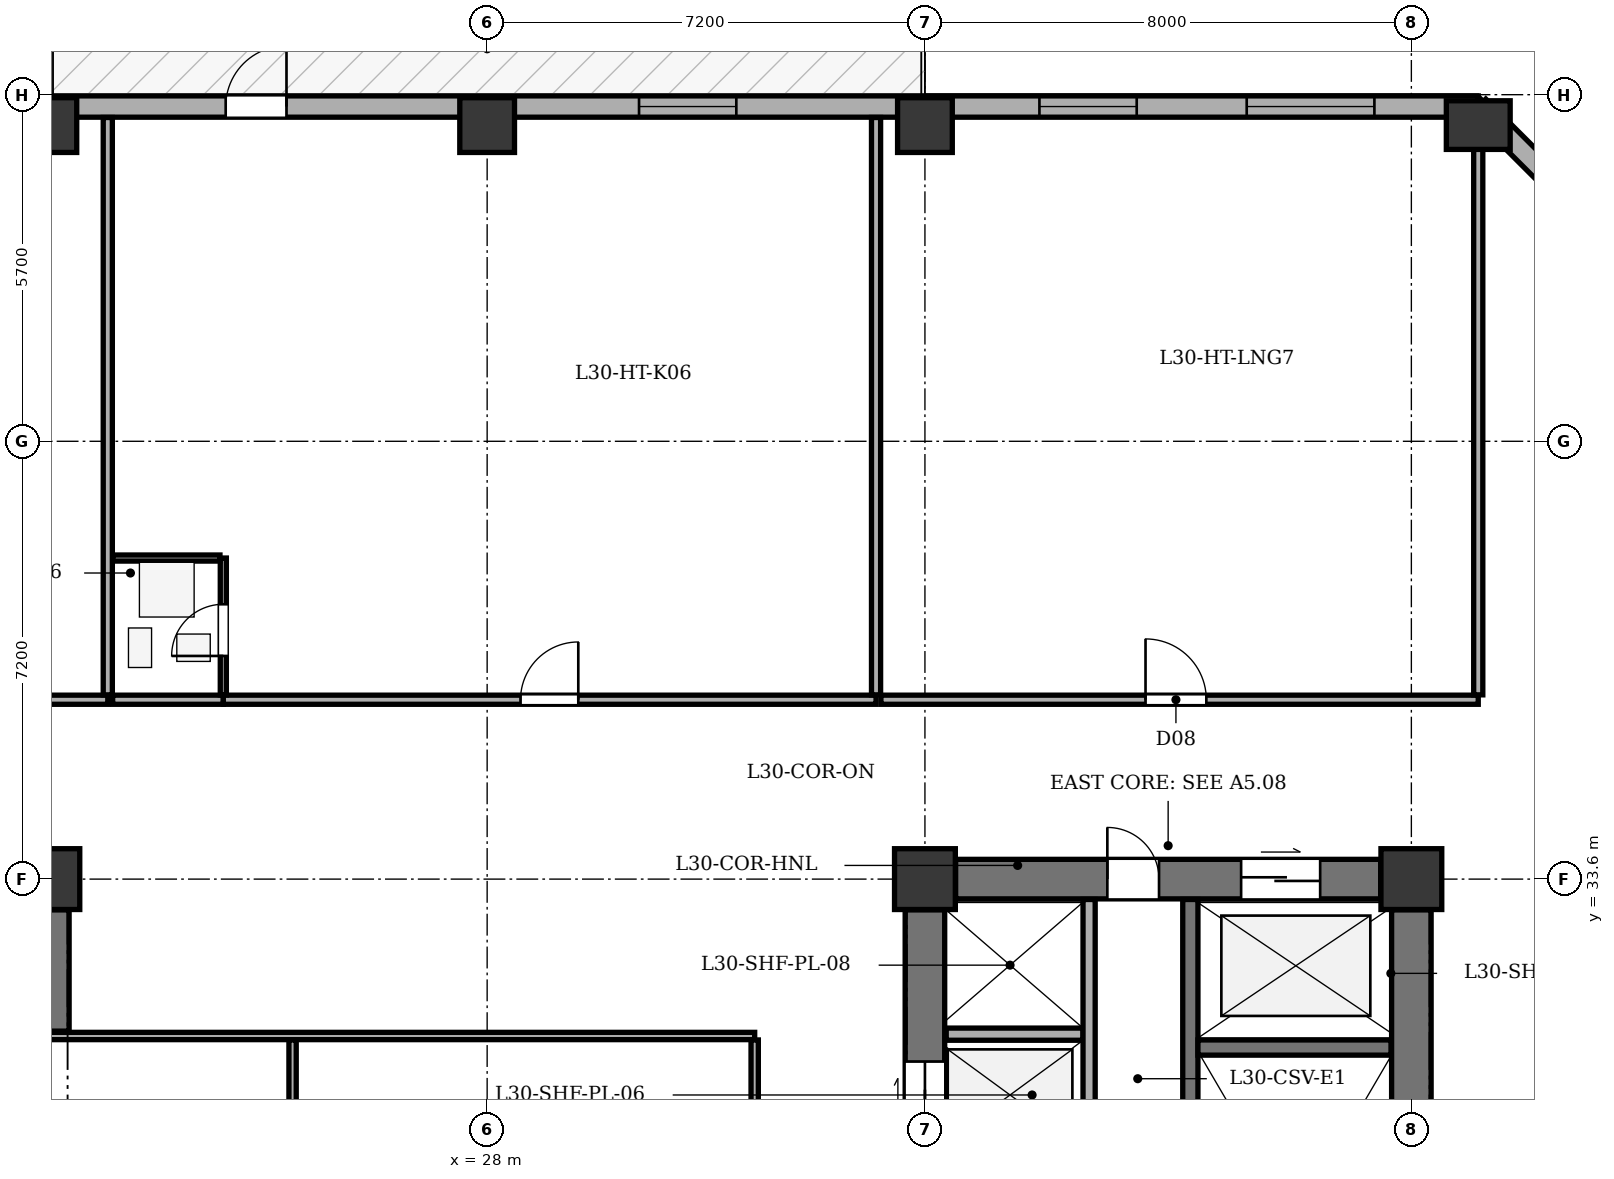
"""IFC4 building model, lengths in metres.
Left out: names, types, materials, properties, quantities, classifications, styles, units other than length and angle.
Written with IfcOpenShell. Run it as: python <this file> out.ifc"""

import sys

from ifc_helpers import new_model, si_unit, direction, frame, frame_2d, origin, origin_2d, place, context, subcontext, project, spatial, rectangle, extrude, element, fill, save


model = new_model("IFC4")
c1 = context("Model", 3, precision=1e-05, world=origin(), true_north=direction((0.0, 1.0)))
c2 = subcontext(c1, "Body", "Model", "MODEL_VIEW")
j1 = project(units=[si_unit("LENGTHUNIT", "METRE"), si_unit("PLANEANGLEUNIT", "RADIAN")], contexts=[c1])
p1 = place(None, origin())
s1 = spatial("IfcSite", under=j1, at=p1, CompositionType="ELEMENT")
p2 = place(p1, origin())
s2 = spatial("IfcBuilding", under=s1, at=p2, CompositionType="ELEMENT")
p3 = place(p2, frame((0.0, 0.0, 123.8)))
s3 = spatial("IfcBuildingStorey", under=s2, at=p3, CompositionType="ELEMENT", Elevation=123.8)
for number, where, z_axis, x_axis in (
    (1, (20.8, 33.6, 0.0), (0.0, 0.0, 1.0), (1.0, 0.0, 0.0)),
    (2, (35.2, 33.6, 0.0), (0.0, 0.0, 1.0), (1.0, 0.0, 0.0)),
    (3, (43.2, 33.6, 0.0), (0.0, 0.0, 1.0), (1.0, 0.0, 0.0)),
):
    element("IfcColumn", number, at=place(p3, frame(where, z_axis=z_axis, x_axis=x_axis)), inside=s3, PredefinedType="COLUMN", context=c2, shape_type="SweptSolid", body=[
        extrude(rectangle(XDim=1.0, YDim=1.0, at=origin_2d()), origin(), (0.0, 0.0, 1.0), 3.5),
    ])
for number, where, z_axis, x_axis in (
    (4, (20.8, 46.0, 0.0), (0.0, 0.0, 1.0), (1.0, 0.0, 0.0)),
    (5, (28.0, 46.0, 0.0), (0.0, 0.0, 1.0), (1.0, 0.0, 0.0)),
    (6, (35.2, 46.0, 0.0), (0.0, 0.0, 1.0), (1.0, 0.0, 0.0)),
):
    element("IfcColumn", number, at=place(p3, frame(where, z_axis=z_axis, x_axis=x_axis)), inside=s3, PredefinedType="COLUMN", context=c2, shape_type="SweptSolid", body=[
        extrude(rectangle(XDim=0.9, YDim=0.9, at=origin_2d()), origin(), (0.0, 0.0, 1.0), 3.5),
    ])
p4 = place(p3, frame((44.3, 46.0, 0.0), z_axis=(0.0, 0.0, 1.0), x_axis=(1.0, 0.0, 0.0)))
e7 = element("IfcColumn", 7, at=p4, inside=s3, PredefinedType="COLUMN", context=c2, shape_type="SweptSolid", body=[
    extrude(rectangle(XDim=0.8, YDim=1.05, at=origin_2d()), origin(), (0.0, 0.0, 1.0), 3.5),
])
p5 = place(p3, frame((9.3, 46.305, 0.0), z_axis=(0.0, 0.0, 1.0), x_axis=(1.0, 0.0, 0.0)))
e8 = element("IfcWall", 8, at=p5, inside=s3, PredefinedType="STANDARD", context=c2, shape_type="SweptSolid", body=[
    extrude(rectangle(XDim=35.0, YDim=0.35, at=frame_2d((17.5, 0.0))), origin(), (0.0, 0.0, 1.0), 2.785),
])
p6 = place(p5, frame((14.4, 0.0, 0.0)))
e9 = element("IfcOpeningElement", 9, at=p6, cuts=e8, PredefinedType="OPENING", context=c2, shape_type="SweptSolid", body=[
    extrude(rectangle(XDim=1.0, YDim=2.02, at=frame_2d((0.5, 1.01))), frame((0.0, 0.185, 0.0), z_axis=(0.0, -1.0, 0.0), x_axis=(1.0, 0.0, 0.0)), (0.0, 0.0, 1.0), 0.37),
])
p7 = place(p5, frame((3.007, 0.0, 0.75)))
e10 = element("IfcOpeningElement", 10, at=p7, cuts=e8, PredefinedType="OPENING", context=c2, shape_type="SweptSolid", body=[
    extrude(rectangle(XDim=1.6, YDim=1.75, at=frame_2d((0.8, 0.875))), frame((0.0, 0.185, 0.0), z_axis=(0.0, -1.0, 0.0), x_axis=(1.0, 0.0, 0.0)), (0.0, 0.0, 1.0), 0.37),
])
p8 = place(p5, frame((7.293, 0.0, 0.75)))
e11 = element("IfcOpeningElement", 11, at=p8, cuts=e8, PredefinedType="OPENING", context=c2, shape_type="SweptSolid", body=[
    extrude(rectangle(XDim=2.1, YDim=1.75, at=frame_2d((1.05, 0.875))), frame((0.0, 0.185, 0.0), z_axis=(0.0, -1.0, 0.0), x_axis=(1.0, 0.0, 0.0)), (0.0, 0.0, 1.0), 0.37),
])
p9 = place(p5, frame((21.198, 0.0, 0.75)))
e12 = element("IfcOpeningElement", 12, at=p9, cuts=e8, PredefinedType="OPENING", context=c2, shape_type="SweptSolid", body=[
    extrude(rectangle(XDim=1.6, YDim=1.75, at=frame_2d((0.8, 0.875))), frame((0.0, 0.185, 0.0), z_axis=(0.0, -1.0, 0.0), x_axis=(1.0, 0.0, 0.0)), (0.0, 0.0, 1.0), 0.37),
])
p10 = place(p5, frame((27.783, 0.0, 0.75)))
e13 = element("IfcOpeningElement", 13, at=p10, cuts=e8, PredefinedType="OPENING", context=c2, shape_type="SweptSolid", body=[
    extrude(rectangle(XDim=1.6, YDim=1.75, at=frame_2d((0.8, 0.875))), frame((0.0, 0.185, 0.0), z_axis=(0.0, -1.0, 0.0), x_axis=(1.0, 0.0, 0.0)), (0.0, 0.0, 1.0), 0.37),
])
p11 = place(p5, frame((31.192, 0.0, 0.75)))
e14 = element("IfcOpeningElement", 14, at=p11, cuts=e8, PredefinedType="OPENING", context=c2, shape_type="SweptSolid", body=[
    extrude(rectangle(XDim=2.1, YDim=1.75, at=frame_2d((1.05, 0.875))), frame((0.0, 0.185, 0.0), z_axis=(0.0, -1.0, 0.0), x_axis=(1.0, 0.0, 0.0)), (0.0, 0.0, 1.0), 0.37),
])
p12 = place(p3, frame((44.3, 46.305, 0.0), z_axis=(0.0, 0.0, 1.0), x_axis=(0.707106781187, -0.707106781187, 0.0)))
e15 = element("IfcWall", 15, at=p12, inside=s3, PredefinedType="STANDARD", context=c2, shape_type="SweptSolid", body=[
    extrude(rectangle(XDim=6.795, YDim=0.35, at=frame_2d((3.397, 0.0))), origin(), (0.0, 0.0, 1.0), 2.785),
])
p13 = place(p12, frame((2.698, 0.0, 0.75)))
e16 = element("IfcOpeningElement", 16, at=p13, cuts=e15, PredefinedType="OPENING", context=c2, shape_type="SweptSolid", body=[
    extrude(rectangle(XDim=1.4, YDim=1.65, at=frame_2d((0.7, 0.825))), frame((0.0, 0.185, 0.0), z_axis=(0.0, -1.0, 0.0), x_axis=(1.0, 0.0, 0.0)), (0.0, 0.0, 1.0), 0.37),
])
p14 = place(p3, frame((20.8, 31.1, 0.0), z_axis=(0.0, 0.0, 1.0), x_axis=(0.0, 1.0, 0.0)))
e17 = element("IfcWall", 17, at=p14, inside=s3, PredefinedType="SHEAR", context=c2, shape_type="SweptSolid", body=[
    extrude(rectangle(XDim=1.995, YDim=0.65, at=frame_2d((0.998, 0.0))), origin(), (0.0, 0.0, 1.0), 3.2),
])
p15 = place(p3, frame((43.2, 21.305, 0.0), z_axis=(0.0, 0.0, 1.0), x_axis=(0.0, 1.0, 0.0)))
e18 = element("IfcWall", 18, at=p15, inside=s3, PredefinedType="SHEAR", context=c2, shape_type="SweptSolid", body=[
    extrude(rectangle(XDim=11.79, YDim=0.65, at=frame_2d((5.895, 0.0))), origin(), (0.0, 0.0, 1.0), 3.2),
])
p16 = place(p3, frame((35.705, 33.6, 0.0), z_axis=(0.0, 0.0, 1.0), x_axis=(1.0, 0.0, 0.0)))
e19 = element("IfcWall", 19, at=p16, inside=s3, PredefinedType="SHEAR", context=c2, shape_type="SweptSolid", body=[
    extrude(rectangle(XDim=6.99, YDim=0.65, at=frame_2d((3.495, 0.0))), origin(), (0.0, 0.0, 1.0), 3.2),
])
p17 = place(p16, frame((4.695, 0.0, 0.0)))
e20 = element("IfcOpeningElement", 20, at=p17, cuts=e19, PredefinedType="OPENING", context=c2, shape_type="SweptSolid", body=[
    extrude(rectangle(XDim=1.3, YDim=2.15, at=frame_2d((0.65, 1.075))), frame((0.0, 0.335, 0.0), z_axis=(0.0, -1.0, 0.0), x_axis=(1.0, 0.0, 0.0)), (0.0, 0.0, 1.0), 0.67),
])
p18 = place(p16, frame((2.495, 0.0, 0.0)))
e21 = element("IfcOpeningElement", 21, at=p18, cuts=e19, PredefinedType="OPENING", context=c2, shape_type="SweptSolid", body=[
    extrude(rectangle(XDim=0.85, YDim=2.02, at=frame_2d((0.425, 1.01))), frame((0.0, 0.335, 0.0), z_axis=(0.0, -1.0, 0.0), x_axis=(1.0, 0.0, 0.0)), (0.0, 0.0, 1.0), 0.67),
])
p19 = place(p3, frame((35.2, 21.305, 0.0), z_axis=(0.0, 0.0, 1.0), x_axis=(0.0, 1.0, 0.0)))
e22 = element("IfcWall", 22, at=p19, inside=s3, PredefinedType="SHEAR", context=c2, shape_type="SweptSolid", body=[
    extrude(rectangle(XDim=11.79, YDim=0.65, at=frame_2d((5.895, 0.0))), origin(), (0.0, 0.0, 1.0), 3.2),
])
p20 = place(p19, frame((1.295, 0.0, 0.0)))
e23 = element("IfcOpeningElement", 23, at=p20, cuts=e22, PredefinedType="OPENING", context=c2, shape_type="SweptSolid", body=[
    extrude(rectangle(XDim=1.2, YDim=2.15, at=frame_2d((0.6, 1.075))), frame((0.0, 0.335, 0.0), z_axis=(0.0, -1.0, 0.0), x_axis=(1.0, 0.0, 0.0)), (0.0, 0.0, 1.0), 0.67),
])
p21 = place(p19, frame((4.295, 0.0, 0.0)))
e24 = element("IfcOpeningElement", 24, at=p21, cuts=e22, PredefinedType="OPENING", context=c2, shape_type="SweptSolid", body=[
    extrude(rectangle(XDim=1.1, YDim=2.1, at=frame_2d((0.55, 1.05))), frame((0.0, 0.335, 0.0), z_axis=(0.0, -1.0, 0.0), x_axis=(1.0, 0.0, 0.0)), (0.0, 0.0, 1.0), 0.67),
])
p22 = place(p19, frame((6.245, 0.0, 0.0)))
e25 = element("IfcOpeningElement", 25, at=p22, cuts=e22, PredefinedType="OPENING", context=c2, shape_type="SweptSolid", body=[
    extrude(rectangle(XDim=1.1, YDim=2.1, at=frame_2d((0.55, 1.05))), frame((0.0, 0.335, 0.0), z_axis=(0.0, -1.0, 0.0), x_axis=(1.0, 0.0, 0.0)), (0.0, 0.0, 1.0), 0.67),
])
p23 = place(p19, frame((8.195, 0.0, 0.0)))
e26 = element("IfcOpeningElement", 26, at=p23, cuts=e22, PredefinedType="OPENING", context=c2, shape_type="SweptSolid", body=[
    extrude(rectangle(XDim=1.1, YDim=2.1, at=frame_2d((0.55, 1.05))), frame((0.0, 0.335, 0.0), z_axis=(0.0, -1.0, 0.0), x_axis=(1.0, 0.0, 0.0)), (0.0, 0.0, 1.0), 0.67),
])
p24 = place(p3, frame((39.565, 21.135, 0.0), z_axis=(0.0, 0.0, 1.0), x_axis=(0.0, 1.0, 0.0)))
e27 = element("IfcWall", 27, at=p24, inside=s3, PredefinedType="SHEAR", context=c2, shape_type="SweptSolid", body=[
    extrude(rectangle(XDim=12.13, YDim=0.25, at=frame_2d((6.065, 0.0))), origin(), (0.0, 0.0, 1.0), 3.2),
])
p25 = place(p24, frame((0.515, 0.0, 0.0)))
e28 = element("IfcOpeningElement", 28, at=p25, cuts=e27, PredefinedType="OPENING", context=c2, shape_type="SweptSolid", body=[
    extrude(rectangle(XDim=1.2, YDim=2.15, at=frame_2d((0.6, 1.075))), frame((0.0, 0.135, 0.0), z_axis=(0.0, -1.0, 0.0), x_axis=(1.0, 0.0, 0.0)), (0.0, 0.0, 1.0), 0.27),
])
p26 = place(p24, frame((2.665, 0.0, 0.0)))
e29 = element("IfcOpeningElement", 29, at=p26, cuts=e27, PredefinedType="OPENING", context=c2, shape_type="SweptSolid", body=[
    extrude(rectangle(XDim=1.15, YDim=2.15, at=frame_2d((0.575, 1.075))), frame((0.0, 0.135, 0.0), z_axis=(0.0, -1.0, 0.0), x_axis=(1.0, 0.0, 0.0)), (0.0, 0.0, 1.0), 0.27),
])
p27 = place(p3, frame((39.69, 30.83, 0.0), z_axis=(0.0, 0.0, 1.0), x_axis=(1.0, 0.0, 0.0)))
e30 = element("IfcWall", 30, at=p27, inside=s3, PredefinedType="SHEAR", context=c2, shape_type="SweptSolid", body=[
    extrude(rectangle(XDim=3.175, YDim=0.25, at=frame_2d((1.587, 0.0))), origin(), (0.0, 0.0, 1.0), 3.2),
])
p28 = place(p3, frame((35.55, 31.05, 0.0), z_axis=(0.0, 0.0, 1.0), x_axis=(1.0, 0.0, 0.0)))
e31 = element("IfcWall", 31, at=p28, inside=s3, PredefinedType="SOLIDWALL", context=c2, shape_type="SweptSolid", body=[
    extrude(rectangle(XDim=2.25, YDim=0.2, at=frame_2d((1.125, 0.0))), origin(), (0.0, 0.0, 1.0), 3.2),
])
p29 = place(p3, frame((37.9, 25.27, 0.0), z_axis=(0.0, 0.0, 1.0), x_axis=(0.0, 1.0, 0.0)))
e32 = element("IfcWall", 32, at=p29, inside=s3, PredefinedType="SOLIDWALL", context=c2, shape_type="SweptSolid", body=[
    extrude(rectangle(XDim=7.995, YDim=0.2, at=frame_2d((3.998, 0.0))), origin(), (0.0, 0.0, 1.0), 3.2),
])
p30 = place(p3, frame((20.46, 31.02, 0.0), z_axis=(0.0, 0.0, 1.0), x_axis=(1.0, 0.0, 0.0)))
e33 = element("IfcWall", 33, at=p30, inside=s3, PredefinedType="PARTITIONING", context=c2, shape_type="SweptSolid", body=[
    extrude(rectangle(XDim=11.94, YDim=0.12, at=frame_2d((5.97, 0.0))), origin(), (0.0, 0.0, 1.0), 3.2),
])
p31 = place(p3, frame((32.4, 25.285, 0.0), z_axis=(0.0, 0.0, 1.0), x_axis=(0.0, 1.0, 0.0)))
e34 = element("IfcWall", 34, at=p31, inside=s3, PredefinedType="PARTITIONING", context=c2, shape_type="SweptSolid", body=[
    extrude(rectangle(XDim=5.67, YDim=0.12, at=frame_2d((2.835, 0.0))), origin(), (0.0, 0.0, 1.0), 3.2),
])
p32 = place(p31, frame((2.135, 0.0, 0.0)))
e35 = element("IfcOpeningElement", 35, at=p32, cuts=e34, PredefinedType="OPENING", context=c2, shape_type="SweptSolid", body=[
    extrude(rectangle(XDim=0.95, YDim=2.1, at=frame_2d((0.475, 1.05))), frame((0.0, 0.07, 0.0), z_axis=(0.0, -1.0, 0.0), x_axis=(1.0, 0.0, 0.0)), (0.0, 0.0, 1.0), 0.14),
])
p33 = place(p3, frame((24.8, 25.285, 0.0), z_axis=(0.0, 0.0, 1.0), x_axis=(0.0, 1.0, 0.0)))
e36 = element("IfcWall", 36, at=p33, inside=s3, PredefinedType="PARTITIONING", context=c2, shape_type="SweptSolid", body=[
    extrude(rectangle(XDim=5.67, YDim=0.12, at=frame_2d((2.835, 0.0))), origin(), (0.0, 0.0, 1.0), 3.2),
])
p34 = place(p3, frame((12.05, 36.55, 0.0), z_axis=(0.0, 0.0, 1.0), x_axis=(1.0, 0.0, 0.0)))
e37 = element("IfcWall", 37, at=p34, inside=s3, PredefinedType="PARTITIONING", context=c2, shape_type="SweptSolid", body=[
    extrude(rectangle(XDim=9.711, YDim=0.15, at=frame_2d((4.855, 0.0))), origin(), (0.0, 0.0, 1.0), 3.2),
])
p35 = place(p34, frame((4.375, 0.0, 0.0)))
e38 = element("IfcOpeningElement", 38, at=p35, cuts=e37, PredefinedType="OPENING", context=c2, shape_type="SweptSolid", body=[
    extrude(rectangle(XDim=0.95, YDim=2.1, at=frame_2d((0.475, 1.05))), frame((0.0, 0.085, 0.0), z_axis=(0.0, -1.0, 0.0), x_axis=(1.0, 0.0, 0.0)), (0.0, 0.0, 1.0), 0.17),
])
p36 = place(p3, frame((21.761, 36.63, 0.0), z_axis=(0.0, 0.0, 1.0), x_axis=(0.0, 1.0, 0.0)))
e39 = element("IfcWall", 39, at=p36, inside=s3, PredefinedType="PARTITIONING", context=c2, shape_type="SweptSolid", body=[
    extrude(rectangle(XDim=9.495, YDim=0.15, at=frame_2d((4.748, 0.0))), origin(), (0.0, 0.0, 1.0), 3.2),
])
p37 = place(p3, frame((21.841, 36.55, 0.0), z_axis=(0.0, 0.0, 1.0), x_axis=(1.0, 0.0, 0.0)))
e40 = element("IfcWall", 40, at=p37, inside=s3, PredefinedType="PARTITIONING", context=c2, shape_type="SweptSolid", body=[
    extrude(rectangle(XDim=1.82, YDim=0.15, at=frame_2d((0.91, 0.0))), origin(), (0.0, 0.0, 1.0), 3.2),
])
p38 = place(p3, frame((23.661, 36.55, 0.0), z_axis=(0.0, 0.0, 1.0), x_axis=(1.0, 0.0, 0.0)))
e41 = element("IfcWall", 41, at=p38, inside=s3, PredefinedType="PARTITIONING", context=c2, shape_type="SweptSolid", body=[
    extrude(rectangle(XDim=10.735, YDim=0.15, at=frame_2d((5.368, 0.0))), origin(), (0.0, 0.0, 1.0), 3.2),
])
p39 = place(p38, frame((4.888, 0.0, 0.0)))
e42 = element("IfcOpeningElement", 42, at=p39, cuts=e41, PredefinedType="OPENING", context=c2, shape_type="SweptSolid", body=[
    extrude(rectangle(XDim=0.95, YDim=2.1, at=frame_2d((0.475, 1.05))), frame((0.0, 0.085, 0.0), z_axis=(0.0, -1.0, 0.0), x_axis=(1.0, 0.0, 0.0)), (0.0, 0.0, 1.0), 0.17),
])
p40 = place(p3, frame((23.661, 36.63, 0.0), z_axis=(0.0, 0.0, 1.0), x_axis=(0.0, 1.0, 0.0)))
e43 = element("IfcWall", 43, at=p40, inside=s3, PredefinedType="PARTITIONING", context=c2, shape_type="SweptSolid", body=[
    extrude(rectangle(XDim=2.25, YDim=0.1, at=frame_2d((1.125, 0.0))), origin(), (0.0, 0.0, 1.0), 3.2),
])
p41 = place(p40, frame((0.64, 0.0, 0.0)))
e44 = element("IfcOpeningElement", 44, at=p41, cuts=e43, PredefinedType="OPENING", context=c2, shape_type="SweptSolid", body=[
    extrude(rectangle(XDim=0.85, YDim=2.05, at=frame_2d((0.425, 1.025))), frame((0.0, 0.06, 0.0), z_axis=(0.0, -1.0, 0.0), x_axis=(1.0, 0.0, 0.0)), (0.0, 0.0, 1.0), 0.12),
])
p42 = place(p3, frame((21.841, 38.88, 0.0), z_axis=(0.0, 0.0, 1.0), x_axis=(1.0, 0.0, 0.0)))
e45 = element("IfcWall", 45, at=p42, inside=s3, PredefinedType="PARTITIONING", context=c2, shape_type="SweptSolid", body=[
    extrude(rectangle(XDim=1.765, YDim=0.1, at=frame_2d((0.882, 0.0))), origin(), (0.0, 0.0, 1.0), 3.2),
])
p43 = place(p3, frame((34.396, 36.63, 0.0), z_axis=(0.0, 0.0, 1.0), x_axis=(0.0, 1.0, 0.0)))
e46 = element("IfcWall", 46, at=p43, inside=s3, PredefinedType="PARTITIONING", context=c2, shape_type="SweptSolid", body=[
    extrude(rectangle(XDim=9.495, YDim=0.15, at=frame_2d((4.748, 0.0))), origin(), (0.0, 0.0, 1.0), 3.2),
])
p44 = place(p3, frame((34.476, 36.55, 0.0), z_axis=(0.0, 0.0, 1.0), x_axis=(1.0, 0.0, 0.0)))
e47 = element("IfcWall", 47, at=p44, inside=s3, PredefinedType="PARTITIONING", context=c2, shape_type="SweptSolid", body=[
    extrude(rectangle(XDim=9.824, YDim=0.15, at=frame_2d((4.912, 0.0))), origin(), (0.0, 0.0, 1.0), 3.2),
])
p45 = place(p44, frame((4.352, 0.0, 0.0)))
e48 = element("IfcOpeningElement", 48, at=p45, cuts=e47, PredefinedType="OPENING", context=c2, shape_type="SweptSolid", body=[
    extrude(rectangle(XDim=1.0, YDim=2.1, at=frame_2d((0.5, 1.05))), frame((0.0, 0.085, 0.0), z_axis=(0.0, -1.0, 0.0), x_axis=(1.0, 0.0, 0.0)), (0.0, 0.0, 1.0), 0.17),
])
p46 = place(p3, frame((44.3, 36.63, 0.0), z_axis=(0.0, 0.0, 1.0), x_axis=(0.0, 1.0, 0.0)))
e49 = element("IfcWall", 49, at=p46, inside=s3, PredefinedType="PARTITIONING", context=c2, shape_type="SweptSolid", body=[
    extrude(rectangle(XDim=9.495, YDim=0.15, at=frame_2d((4.748, 0.0))), origin(), (0.0, 0.0, 1.0), 3.2),
])
p47 = place(p6, origin())
e50 = element("IfcDoor", 50, at=p47, inside=s3, OperationType="SINGLE_SWING_RIGHT", PredefinedType="DOOR", context=c2, shape_type="SweptSolid", body=[
    extrude(rectangle(XDim=1.0, YDim=2.02, at=frame_2d((0.5, 1.01))), frame((0.0, 0.025, 0.0), z_axis=(0.0, -1.0, 0.0), x_axis=(1.0, 0.0, 0.0)), (0.0, 0.0, 1.0), 0.05),
])
fill(e9, e50)
p48 = place(p9, origin())
e51 = element("IfcWindow", 51, at=p48, inside=s3, PartitioningType="SINGLE_PANEL", PredefinedType="WINDOW", context=c2, shape_type="SweptSolid", body=[
    extrude(rectangle(XDim=1.6, YDim=1.75, at=frame_2d((0.8, 0.875))), frame((0.0, -0.01, 0.0), z_axis=(0.0, -1.0, 0.0), x_axis=(1.0, 0.0, 0.0)), (0.0, 0.0, 1.0), 0.06),
])
fill(e12, e51)
p49 = place(p10, origin())
e52 = element("IfcWindow", 52, at=p49, inside=s3, PartitioningType="SINGLE_PANEL", PredefinedType="WINDOW", context=c2, shape_type="SweptSolid", body=[
    extrude(rectangle(XDim=1.6, YDim=1.75, at=frame_2d((0.8, 0.875))), frame((0.0, -0.01, 0.0), z_axis=(0.0, -1.0, 0.0), x_axis=(1.0, 0.0, 0.0)), (0.0, 0.0, 1.0), 0.06),
])
fill(e13, e52)
p50 = place(p11, origin())
e53 = element("IfcWindow", 53, at=p50, inside=s3, PartitioningType="SINGLE_PANEL", PredefinedType="WINDOW", context=c2, shape_type="SweptSolid", body=[
    extrude(rectangle(XDim=2.1, YDim=1.75, at=frame_2d((1.05, 0.875))), frame((0.0, -0.01, 0.0), z_axis=(0.0, -1.0, 0.0), x_axis=(1.0, 0.0, 0.0)), (0.0, 0.0, 1.0), 0.06),
])
fill(e14, e53)
p51 = place(p17, origin())
e54 = element("IfcDoor", 54, at=p51, inside=s3, OperationType="DOUBLE_DOOR_SLIDING", PredefinedType="DOOR", context=c2, shape_type="SweptSolid", body=[
    extrude(rectangle(XDim=1.3, YDim=2.15, at=frame_2d((0.65, 1.075))), frame((0.0, 0.025, 0.0), z_axis=(0.0, -1.0, 0.0), x_axis=(1.0, 0.0, 0.0)), (0.0, 0.0, 1.0), 0.05),
])
fill(e20, e54)
p52 = place(p18, origin())
e55 = element("IfcDoor", 55, at=p52, inside=s3, OperationType="SINGLE_SWING_LEFT", PredefinedType="DOOR", context=c2, shape_type="SweptSolid", body=[
    extrude(rectangle(XDim=0.85, YDim=2.02, at=frame_2d((0.425, 1.01))), frame((0.0, 0.025, 0.0), z_axis=(0.0, -1.0, 0.0), x_axis=(1.0, 0.0, 0.0)), (0.0, 0.0, 1.0), 0.05),
])
fill(e21, e55)
p53 = place(p23, origin())
e56 = element("IfcDoor", 56, at=p53, inside=s3, OperationType="DOUBLE_DOOR_SLIDING", PredefinedType="DOOR", context=c2, shape_type="SweptSolid", body=[
    extrude(rectangle(XDim=1.1, YDim=2.1, at=frame_2d((0.55, 1.05))), frame((0.0, 0.025, 0.0), z_axis=(0.0, -1.0, 0.0), x_axis=(1.0, 0.0, 0.0)), (0.0, 0.0, 1.0), 0.05),
])
fill(e26, e56)
p54 = place(p41, origin())
e57 = element("IfcDoor", 57, at=p54, inside=s3, OperationType="SINGLE_SWING_LEFT", PredefinedType="DOOR", context=c2, shape_type="SweptSolid", body=[
    extrude(rectangle(XDim=0.85, YDim=2.05, at=frame_2d((0.425, 1.025))), frame((0.0, 0.025, 0.0), z_axis=(0.0, -1.0, 0.0), x_axis=(1.0, 0.0, 0.0)), (0.0, 0.0, 1.0), 0.05),
])
fill(e44, e57)
p55 = place(p39, origin())
e58 = element("IfcDoor", 58, at=p55, inside=s3, OperationType="SINGLE_SWING_RIGHT", PredefinedType="DOOR", context=c2, shape_type="SweptSolid", body=[
    extrude(rectangle(XDim=0.95, YDim=2.1, at=frame_2d((0.475, 1.05))), frame((0.0, 0.025, 0.0), z_axis=(0.0, -1.0, 0.0), x_axis=(1.0, 0.0, 0.0)), (0.0, 0.0, 1.0), 0.05),
])
fill(e42, e58)
p56 = place(p45, origin())
e59 = element("IfcDoor", 59, at=p56, inside=s3, OperationType="SINGLE_SWING_LEFT", PredefinedType="DOOR", context=c2, shape_type="SweptSolid", body=[
    extrude(rectangle(XDim=1.0, YDim=2.1, at=frame_2d((0.5, 1.05))), frame((0.0, 0.025, 0.0), z_axis=(0.0, -1.0, 0.0), x_axis=(1.0, 0.0, 0.0)), (0.0, 0.0, 1.0), 0.05),
])
fill(e48, e59)
save(model, sys.argv[1])
